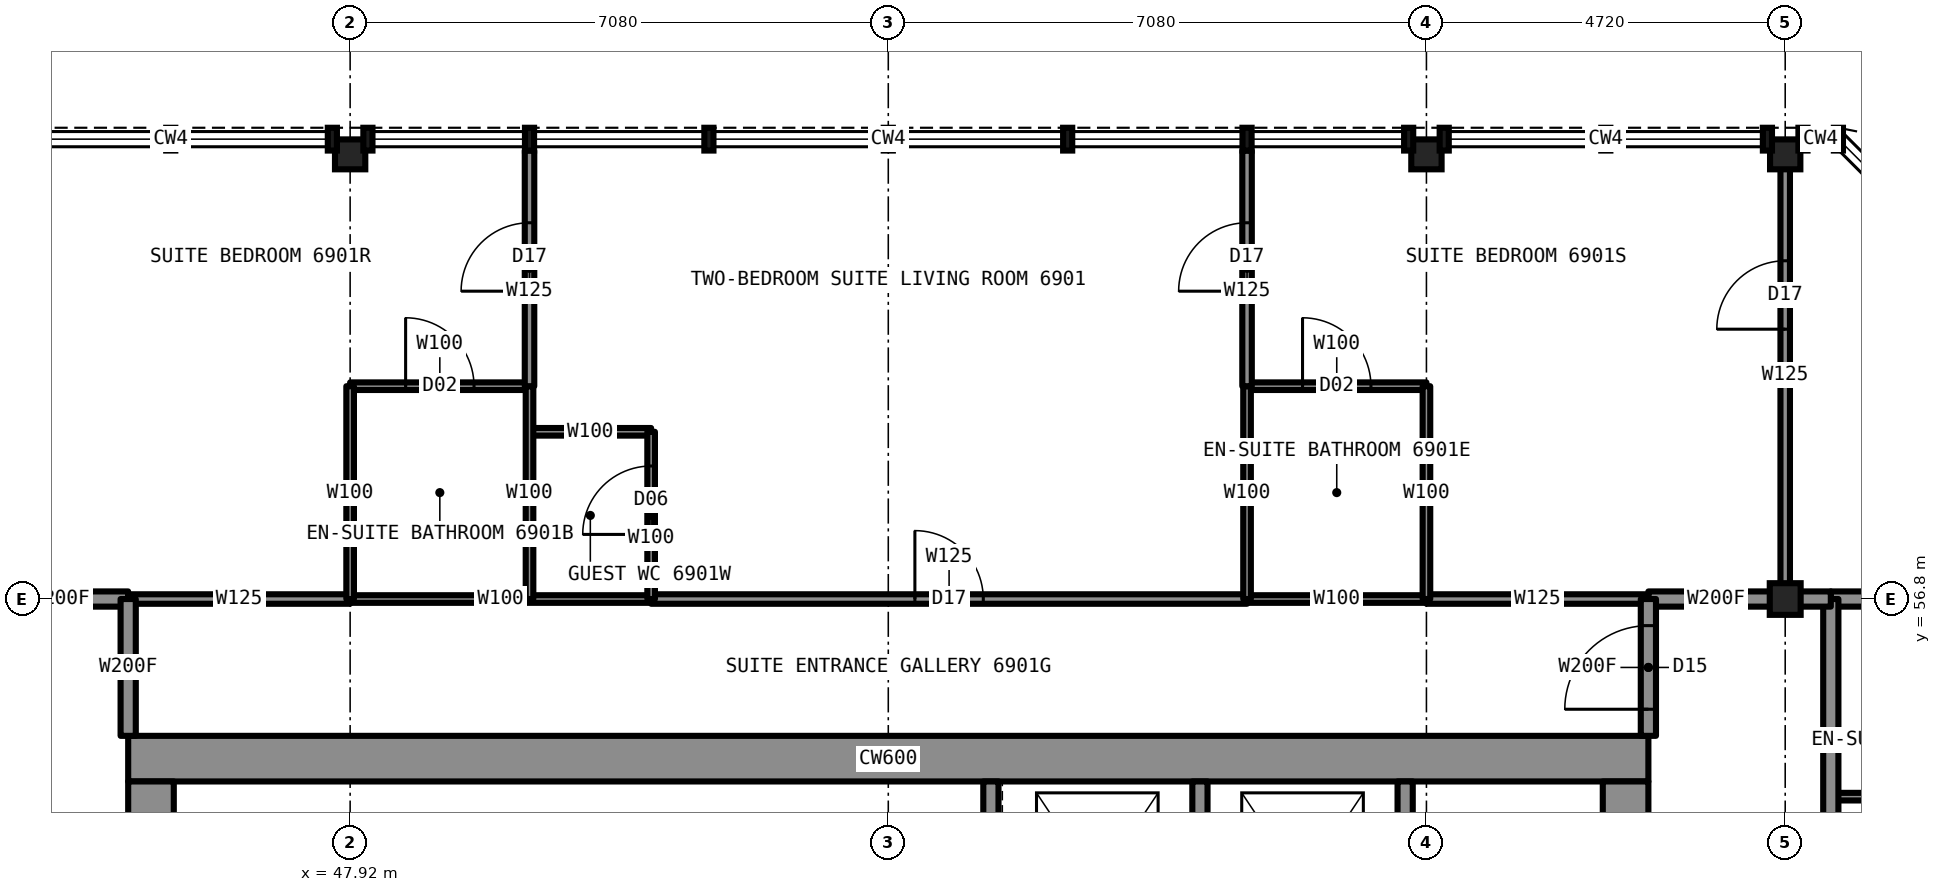
"""IFC4 building model, lengths in metres.
Left out: names, types, materials, properties, quantities, classifications, styles, units other than length and angle.
Written with IfcOpenShell. Run it as: python <this file> out.ifc"""

import sys

from ifc_helpers import new_model, si_unit, direction, frame, frame_2d, origin, origin_2d, place, context, subcontext, project, spatial, rectangle, i_section, extrude, element, fill, save


model = new_model("IFC4")
c1 = context("Model", 3, precision=1e-05, world=origin(), true_north=direction((0.0, 1.0)))
c2 = subcontext(c1, "Body", "Model", "MODEL_VIEW")
j1 = project(units=[si_unit("LENGTHUNIT", "METRE"), si_unit("PLANEANGLEUNIT", "RADIAN")], contexts=[c1])
p1 = place(None, origin())
s1 = spatial("IfcSite", under=j1, at=p1, CompositionType="ELEMENT")
p2 = place(p1, origin())
s2 = spatial("IfcBuilding", under=s1, at=p2, CompositionType="ELEMENT")
p3 = place(p2, frame((0.0, 0.0, 254.7)))
s3 = spatial("IfcBuildingStorey", under=s2, at=p3, CompositionType="ELEMENT", Elevation=254.7)
for number, where, z_axis, x_axis in (
    (1, (47.92, 62.65, 0.0), (0.0, 0.0, 1.0), (1.0, 0.0, 0.0)),
    (2, (62.08, 62.65, 0.0), (0.0, 0.0, 1.0), (1.0, 0.0, 0.0)),
    (3, (66.8, 62.65, 0.0), (0.0, 0.0, 1.0), (1.0, 0.0, 0.0)),
):
    element("IfcColumn", number, at=place(p3, frame(where, z_axis=z_axis, x_axis=x_axis)), inside=s3, PredefinedType="COLUMN", context=c2, shape_type="SweptSolid", body=[
        extrude(i_section(OverallWidth=0.399, OverallDepth=0.394, WebThickness=0.023, FlangeThickness=0.037, at=origin_2d()), origin(), (0.0, 0.0, 1.0), 3.5),
    ])
p4 = place(p3, frame((66.8, 56.8, 0.0), z_axis=(0.0, 0.0, 1.0), x_axis=(1.0, 0.0, 0.0)))
e4 = element("IfcColumn", 4, at=p4, inside=s3, PredefinedType="COLUMN", context=c2, shape_type="SweptSolid", body=[
    extrude(i_section(OverallWidth=0.406, OverallDepth=0.417, WebThickness=0.03, FlangeThickness=0.048, at=origin_2d()), origin(), (0.0, 0.0, 1.0), 3.5),
])
p5 = place(p3, frame((45.0, 54.7, 0.0), z_axis=(0.0, 0.0, 1.0), x_axis=(1.0, 0.0, 0.0)))
e5 = element("IfcWall", 5, at=p5, inside=s3, PredefinedType="SHEAR", context=c2, shape_type="SweptSolid", body=[
    extrude(rectangle(XDim=20.0, YDim=0.6, at=frame_2d((10.0, 0.0))), origin(), (0.0, 0.0, 1.0), 3.5),
])
p6 = place(p3, frame((64.7, 35.6, 0.0), z_axis=(0.0, 0.0, 1.0), x_axis=(0.0, 1.0, 0.0)))
e6 = element("IfcWall", 6, at=p6, inside=s3, PredefinedType="SHEAR", context=c2, shape_type="SweptSolid", body=[
    extrude(rectangle(XDim=18.8, YDim=0.6, at=frame_2d((9.4, 0.0))), origin(), (0.0, 0.0, 1.0), 3.5),
])
p7 = place(p6, frame((13.4, 0.0, 0.0)))
e7 = element("IfcOpeningElement", 7, at=p7, cuts=e6, PredefinedType="OPENING", context=c2, shape_type="SweptSolid", body=[
    extrude(rectangle(XDim=1.8, YDim=2.2, at=frame_2d((0.9, 1.1))), frame((0.0, 0.31, 0.0), z_axis=(0.0, -1.0, 0.0), x_axis=(1.0, 0.0, 0.0)), (0.0, 0.0, 1.0), 0.62),
])
p8 = place(p6, frame((3.6, 0.0, 0.0)))
e8 = element("IfcOpeningElement", 8, at=p8, cuts=e6, PredefinedType="OPENING", context=c2, shape_type="SweptSolid", body=[
    extrude(rectangle(XDim=1.8, YDim=2.2, at=frame_2d((0.9, 1.1))), frame((0.0, 0.31, 0.0), z_axis=(0.0, -1.0, 0.0), x_axis=(1.0, 0.0, 0.0)), (0.0, 0.0, 1.0), 0.62),
])
p9 = place(p3, frame((45.3, 35.6, 0.0), z_axis=(0.0, 0.0, 1.0), x_axis=(0.0, 1.0, 0.0)))
e9 = element("IfcWall", 9, at=p9, inside=s3, PredefinedType="SHEAR", context=c2, shape_type="SweptSolid", body=[
    extrude(rectangle(XDim=18.8, YDim=0.6, at=frame_2d((9.4, 0.0))), origin(), (0.0, 0.0, 1.0), 3.5),
])
p10 = place(p9, frame((13.4, 0.0, 0.0)))
e10 = element("IfcOpeningElement", 10, at=p10, cuts=e9, PredefinedType="OPENING", context=c2, shape_type="SweptSolid", body=[
    extrude(rectangle(XDim=1.8, YDim=2.2, at=frame_2d((0.9, 1.1))), frame((0.0, 0.31, 0.0), z_axis=(0.0, -1.0, 0.0), x_axis=(1.0, 0.0, 0.0)), (0.0, 0.0, 1.0), 0.62),
])
p11 = place(p9, frame((3.6, 0.0, 0.0)))
e11 = element("IfcOpeningElement", 11, at=p11, cuts=e9, PredefinedType="OPENING", context=c2, shape_type="SweptSolid", body=[
    extrude(rectangle(XDim=1.8, YDim=2.2, at=frame_2d((0.9, 1.1))), frame((0.0, 0.31, 0.0), z_axis=(0.0, -1.0, 0.0), x_axis=(1.0, 0.0, 0.0)), (0.0, 0.0, 1.0), 0.62),
])
p12 = place(p9, frame((6.4, 0.0, 0.0)))
e12 = element("IfcOpeningElement", 12, at=p12, cuts=e9, PredefinedType="OPENING", context=c2, shape_type="SweptSolid", body=[
    extrude(rectangle(XDim=1.2, YDim=2.2, at=frame_2d((0.6, 1.1))), frame((0.0, 0.31, 0.0), z_axis=(0.0, -1.0, 0.0), x_axis=(1.0, 0.0, 0.0)), (0.0, 0.0, 1.0), 0.62),
])
p13 = place(p3, frame((47.92, 56.8, 0.0), z_axis=(0.0, 0.0, 1.0), x_axis=(1.0, 0.0, 0.0)))
e13 = element("IfcWall", 13, at=p13, inside=s3, PredefinedType="PARTITIONING", context=c2, shape_type="SweptSolid", body=[
    extrude(rectangle(XDim=3.96, YDim=0.1, at=frame_2d((1.98, 0.0))), origin(), (0.0, 0.0, 1.0), 3.33),
])
p14 = place(p3, frame((59.72, 56.8, 0.0), z_axis=(0.0, 0.0, 1.0), x_axis=(1.0, 0.0, 0.0)))
e14 = element("IfcWall", 14, at=p14, inside=s3, PredefinedType="PARTITIONING", context=c2, shape_type="SweptSolid", body=[
    extrude(rectangle(XDim=2.36, YDim=0.1, at=frame_2d((1.18, 0.0))), origin(), (0.0, 0.0, 1.0), 3.33),
])
for number, where, z_axis, x_axis in (
    (15, (43.22, 56.8, 0.0), (0.0, 0.0, 1.0), (1.0, 0.0, 0.0)),
    (16, (65.0, 56.8, 0.0), (0.0, 0.0, 1.0), (1.0, 0.0, 0.0)),
):
    element("IfcWall", number, at=place(p3, frame(where, z_axis=z_axis, x_axis=x_axis)), inside=s3, PredefinedType="PARTITIONING", context=c2, shape_type="SweptSolid", body=[
        extrude(rectangle(XDim=1.78, YDim=0.2, at=frame_2d((0.89, 0.0))), origin(), (0.0, 0.0, 1.0), 3.33),
    ])
p15 = place(p3, frame((67.4, 56.8, 0.0), z_axis=(0.0, 0.0, 1.0), x_axis=(1.0, 0.0, 0.0)))
e17 = element("IfcWall", 17, at=p15, inside=s3, PredefinedType="PARTITIONING", context=c2, shape_type="SweptSolid", body=[
    extrude(rectangle(XDim=5.3, YDim=0.2, at=frame_2d((2.65, 0.0))), origin(), (0.0, 0.0, 1.0), 2.573),
])
p16 = place(p3, frame((45.0, 56.8, 0.0), z_axis=(0.0, 0.0, 1.0), x_axis=(1.0, 0.0, 0.0)))
e18 = element("IfcWall", 18, at=p16, inside=s3, PredefinedType="PARTITIONING", context=c2, shape_type="SweptSolid", body=[
    extrude(rectangle(XDim=2.92, YDim=0.125, at=frame_2d((1.46, 0.0))), origin(), (0.0, 0.0, 1.0), 3.33),
])
p17 = place(p3, frame((51.88, 56.8, 0.0), z_axis=(0.0, 0.0, 1.0), x_axis=(1.0, 0.0, 0.0)))
e19 = element("IfcWall", 19, at=p17, inside=s3, PredefinedType="PARTITIONING", context=c2, shape_type="SweptSolid", body=[
    extrude(rectangle(XDim=7.84, YDim=0.125, at=frame_2d((3.92, 0.0))), origin(), (0.0, 0.0, 1.0), 3.33),
])
p18 = place(p17, frame((3.47, 0.0, 0.0)))
e20 = element("IfcOpeningElement", 20, at=p18, cuts=e19, PredefinedType="OPENING", context=c2, shape_type="SweptSolid", body=[
    extrude(rectangle(XDim=0.9, YDim=2.2, at=frame_2d((0.45, 1.1))), frame((0.0, 0.073, 0.0), z_axis=(0.0, -1.0, 0.0), x_axis=(1.0, 0.0, 0.0)), (0.0, 0.0, 1.0), 0.145),
])
p19 = place(p3, frame((62.08, 56.8, 0.0), z_axis=(0.0, 0.0, 1.0), x_axis=(1.0, 0.0, 0.0)))
e21 = element("IfcWall", 21, at=p19, inside=s3, PredefinedType="PARTITIONING", context=c2, shape_type="SweptSolid", body=[
    extrude(rectangle(XDim=2.92, YDim=0.125, at=frame_2d((1.46, 0.0))), origin(), (0.0, 0.0, 1.0), 3.33),
])
p20 = place(p3, frame((50.28, 59.0, 0.0), z_axis=(0.0, 0.0, 1.0), x_axis=(1.0, 0.0, 0.0)))
e22 = element("IfcWall", 22, at=p20, inside=s3, PredefinedType="PARTITIONING", context=c2, shape_type="SweptSolid", body=[
    extrude(rectangle(XDim=1.6, YDim=0.1, at=frame_2d((0.8, 0.0))), origin(), (0.0, 0.0, 1.0), 3.33),
])
p21 = place(p3, frame((47.92, 59.6, 0.0), z_axis=(0.0, 0.0, 1.0), x_axis=(1.0, 0.0, 0.0)))
e23 = element("IfcWall", 23, at=p21, inside=s3, PredefinedType="PARTITIONING", context=c2, shape_type="SweptSolid", body=[
    extrude(rectangle(XDim=2.36, YDim=0.1, at=frame_2d((1.18, 0.0))), origin(), (0.0, 0.0, 1.0), 3.33),
])
p22 = place(p21, frame((0.73, 0.0, 0.0)))
e24 = element("IfcOpeningElement", 24, at=p22, cuts=e23, PredefinedType="OPENING", context=c2, shape_type="SweptSolid", body=[
    extrude(rectangle(XDim=0.9, YDim=2.1, at=frame_2d((0.45, 1.05))), frame((0.0, 0.06, 0.0), z_axis=(0.0, -1.0, 0.0), x_axis=(1.0, 0.0, 0.0)), (0.0, 0.0, 1.0), 0.12),
])
p23 = place(p3, frame((59.72, 59.6, 0.0), z_axis=(0.0, 0.0, 1.0), x_axis=(1.0, 0.0, 0.0)))
e25 = element("IfcWall", 25, at=p23, inside=s3, PredefinedType="PARTITIONING", context=c2, shape_type="SweptSolid", body=[
    extrude(rectangle(XDim=2.36, YDim=0.1, at=frame_2d((1.18, 0.0))), origin(), (0.0, 0.0, 1.0), 3.33),
])
p24 = place(p23, frame((0.73, 0.0, 0.0)))
e26 = element("IfcOpeningElement", 26, at=p24, cuts=e25, PredefinedType="OPENING", context=c2, shape_type="SweptSolid", body=[
    extrude(rectangle(XDim=0.9, YDim=2.1, at=frame_2d((0.45, 1.05))), frame((0.0, 0.06, 0.0), z_axis=(0.0, -1.0, 0.0), x_axis=(1.0, 0.0, 0.0)), (0.0, 0.0, 1.0), 0.12),
])
p25 = place(p3, frame((67.4, 54.2, 0.0), z_axis=(0.0, 0.0, 1.0), x_axis=(1.0, 0.0, 0.0)))
e27 = element("IfcWall", 27, at=p25, inside=s3, PredefinedType="PARTITIONING", context=c2, shape_type="SweptSolid", body=[
    extrude(rectangle(XDim=3.0, YDim=0.1, at=frame_2d((1.5, 0.0))), origin(), (0.0, 0.0, 1.0), 3.33),
])
p26 = place(p3, frame((45.0, 55.0, 0.0), z_axis=(0.0, 0.0, 1.0), x_axis=(0.0, 1.0, 0.0)))
e28 = element("IfcWall", 28, at=p26, inside=s3, PredefinedType="PARTITIONING", context=c2, shape_type="SweptSolid", body=[
    extrude(rectangle(XDim=1.8, YDim=0.2, at=frame_2d((0.9, 0.0))), origin(), (0.0, 0.0, 1.0), 3.33),
])
p27 = place(p3, frame((51.88, 56.8, 0.0), z_axis=(0.0, 0.0, 1.0), x_axis=(0.0, 1.0, 0.0)))
e29 = element("IfcWall", 29, at=p27, inside=s3, PredefinedType="PARTITIONING", context=c2, shape_type="SweptSolid", body=[
    extrude(rectangle(XDim=2.2, YDim=0.1, at=frame_2d((1.1, 0.0))), origin(), (0.0, 0.0, 1.0), 3.33),
])
p28 = place(p27, frame((0.85, 0.0, 0.0)))
e30 = element("IfcOpeningElement", 30, at=p28, cuts=e29, PredefinedType="OPENING", context=c2, shape_type="SweptSolid", body=[
    extrude(rectangle(XDim=0.9, YDim=2.1, at=frame_2d((0.45, 1.05))), frame((0.0, 0.06, 0.0), z_axis=(0.0, -1.0, 0.0), x_axis=(1.0, 0.0, 0.0)), (0.0, 0.0, 1.0), 0.12),
])
p29 = place(p3, frame((50.28, 56.8, 0.0), z_axis=(0.0, 0.0, 1.0), x_axis=(0.0, 1.0, 0.0)))
e31 = element("IfcWall", 31, at=p29, inside=s3, PredefinedType="PARTITIONING", context=c2, shape_type="SweptSolid", body=[
    extrude(rectangle(XDim=2.8, YDim=0.1, at=frame_2d((1.4, 0.0))), origin(), (0.0, 0.0, 1.0), 3.33),
])
p30 = place(p3, frame((50.28, 59.6, 0.0), z_axis=(0.0, 0.0, 1.0), x_axis=(0.0, 1.0, 0.0)))
e32 = element("IfcWall", 32, at=p30, inside=s3, PredefinedType="PARTITIONING", context=c2, shape_type="SweptSolid", body=[
    extrude(rectangle(XDim=3.1, YDim=0.125, at=frame_2d((1.55, 0.0))), origin(), (0.0, 0.0, 1.0), 3.33),
])
p31 = place(p30, frame((1.25, 0.0, 0.0)))
e33 = element("IfcOpeningElement", 33, at=p31, cuts=e32, PredefinedType="OPENING", context=c2, shape_type="SweptSolid", body=[
    extrude(rectangle(XDim=0.9, YDim=2.2, at=frame_2d((0.45, 1.1))), frame((0.0, 0.073, 0.0), z_axis=(0.0, -1.0, 0.0), x_axis=(1.0, 0.0, 0.0)), (0.0, 0.0, 1.0), 0.145),
])
p32 = place(p3, frame((47.92, 56.8, 0.0), z_axis=(0.0, 0.0, 1.0), x_axis=(0.0, 1.0, 0.0)))
e34 = element("IfcWall", 34, at=p32, inside=s3, PredefinedType="PARTITIONING", context=c2, shape_type="SweptSolid", body=[
    extrude(rectangle(XDim=2.8, YDim=0.1, at=frame_2d((1.4, 0.0))), origin(), (0.0, 0.0, 1.0), 2.573),
])
p33 = place(p3, frame((65.0, 55.0, 0.0), z_axis=(0.0, 0.0, 1.0), x_axis=(0.0, 1.0, 0.0)))
e35 = element("IfcWall", 35, at=p33, inside=s3, PredefinedType="PARTITIONING", context=c2, shape_type="SweptSolid", body=[
    extrude(rectangle(XDim=1.8, YDim=0.2, at=frame_2d((0.9, 0.0))), origin(), (0.0, 0.0, 1.0), 3.33),
])
p34 = place(p33, frame((0.35, 0.0, 0.0)))
e36 = element("IfcOpeningElement", 36, at=p34, cuts=e35, PredefinedType="OPENING", context=c2, shape_type="SweptSolid", body=[
    extrude(rectangle(XDim=1.1, YDim=2.2, at=frame_2d((0.55, 1.1))), frame((0.0, 0.11, 0.0), z_axis=(0.0, -1.0, 0.0), x_axis=(1.0, 0.0, 0.0)), (0.0, 0.0, 1.0), 0.22),
])
p35 = place(p3, frame((66.8, 56.8, 0.0), z_axis=(0.0, 0.0, 1.0), x_axis=(0.0, 1.0, 0.0)))
e37 = element("IfcWall", 37, at=p35, inside=s3, PredefinedType="PARTITIONING", context=c2, shape_type="SweptSolid", body=[
    extrude(rectangle(XDim=5.9, YDim=0.125, at=frame_2d((2.95, 0.0))), origin(), (0.0, 0.0, 1.0), 2.573),
])
p36 = place(p35, frame((3.55, 0.0, 0.0)))
e38 = element("IfcOpeningElement", 38, at=p36, cuts=e37, PredefinedType="OPENING", context=c2, shape_type="SweptSolid", body=[
    extrude(rectangle(XDim=0.9, YDim=2.2, at=frame_2d((0.45, 1.1))), frame((0.0, 0.073, 0.0), z_axis=(0.0, -1.0, 0.0), x_axis=(1.0, 0.0, 0.0)), (0.0, 0.0, 1.0), 0.145),
])
p37 = place(p3, frame((67.4, 33.2, 0.0), z_axis=(0.0, 0.0, 1.0), x_axis=(0.0, 1.0, 0.0)))
e39 = element("IfcWall", 39, at=p37, inside=s3, PredefinedType="PARTITIONING", context=c2, shape_type="SweptSolid", body=[
    extrude(rectangle(XDim=23.6, YDim=0.2, at=frame_2d((11.8, 0.0))), origin(), (0.0, 0.0, 1.0), 3.33),
])
p38 = place(p37, frame((8.95, 0.0, 0.0)))
e40 = element("IfcOpeningElement", 40, at=p38, cuts=e39, PredefinedType="OPENING", context=c2, shape_type="SweptSolid", body=[
    extrude(rectangle(XDim=1.1, YDim=2.2, at=frame_2d((0.55, 1.1))), frame((0.0, 0.11, 0.0), z_axis=(0.0, -1.0, 0.0), x_axis=(1.0, 0.0, 0.0)), (0.0, 0.0, 1.0), 0.22),
])
p39 = place(p3, frame((59.72, 56.8, 0.0), z_axis=(0.0, 0.0, 1.0), x_axis=(0.0, 1.0, 0.0)))
e41 = element("IfcWall", 41, at=p39, inside=s3, PredefinedType="PARTITIONING", context=c2, shape_type="SweptSolid", body=[
    extrude(rectangle(XDim=2.8, YDim=0.1, at=frame_2d((1.4, 0.0))), origin(), (0.0, 0.0, 1.0), 3.33),
])
p40 = place(p3, frame((59.72, 59.6, 0.0), z_axis=(0.0, 0.0, 1.0), x_axis=(0.0, 1.0, 0.0)))
e42 = element("IfcWall", 42, at=p40, inside=s3, PredefinedType="PARTITIONING", context=c2, shape_type="SweptSolid", body=[
    extrude(rectangle(XDim=3.1, YDim=0.125, at=frame_2d((1.55, 0.0))), origin(), (0.0, 0.0, 1.0), 3.33),
])
p41 = place(p40, frame((1.25, 0.0, 0.0)))
e43 = element("IfcOpeningElement", 43, at=p41, cuts=e42, PredefinedType="OPENING", context=c2, shape_type="SweptSolid", body=[
    extrude(rectangle(XDim=0.9, YDim=2.2, at=frame_2d((0.45, 1.1))), frame((0.0, 0.073, 0.0), z_axis=(0.0, -1.0, 0.0), x_axis=(1.0, 0.0, 0.0)), (0.0, 0.0, 1.0), 0.145),
])
p42 = place(p3, frame((62.08, 56.8, 0.0), z_axis=(0.0, 0.0, 1.0), x_axis=(0.0, 1.0, 0.0)))
e44 = element("IfcWall", 44, at=p42, inside=s3, PredefinedType="PARTITIONING", context=c2, shape_type="SweptSolid", body=[
    extrude(rectangle(XDim=2.8, YDim=0.1, at=frame_2d((1.4, 0.0))), origin(), (0.0, 0.0, 1.0), 2.573),
])
for number, where, z_axis, x_axis in (
    (45, (59.1, 51.7, 0.0), (0.0, 0.0, 1.0), (0.0, 1.0, 0.0)),
    (46, (61.8, 51.7, 0.0), (0.0, 0.0, 1.0), (0.0, 1.0, 0.0)),
    (47, (56.35, 51.7, 0.0), (0.0, 0.0, 1.0), (0.0, 1.0, 0.0)),
):
    element("IfcWall", number, at=place(p3, frame(where, z_axis=z_axis, x_axis=x_axis)), inside=s3, PredefinedType="PARTITIONING", context=c2, shape_type="SweptSolid", body=[
        extrude(rectangle(XDim=2.7, YDim=0.2, at=frame_2d((1.35, 0.0))), origin(), (0.0, 0.0, 1.0), 3.33),
    ])
p43 = place(p3, frame((66.78, 56.8, 0.0), z_axis=(0.0, 0.0, 1.0), x_axis=(1.0, 0.0, 0.0)))
e48 = element("IfcWall", 48, at=p43, inside=s3, PredefinedType="PARTITIONING", context=c2, shape_type="SweptSolid", body=[
    extrude(rectangle(XDim=0.62, YDim=0.2, at=frame_2d((0.31, 0.0))), origin(), (0.0, 0.0, 1.0), 2.573),
])
p44 = place(p18, origin())
e49 = element("IfcDoor", 49, at=p44, inside=s3, OperationType="SINGLE_SWING_LEFT", PredefinedType="DOOR", context=c2, shape_type="SweptSolid", body=[
    extrude(rectangle(XDim=0.9, YDim=2.2, at=frame_2d((0.45, 1.1))), frame((0.0, 0.025, 0.0), z_axis=(0.0, -1.0, 0.0), x_axis=(1.0, 0.0, 0.0)), (0.0, 0.0, 1.0), 0.05),
])
fill(e20, e49)
p45 = place(p22, origin())
e50 = element("IfcDoor", 50, at=p45, inside=s3, OperationType="SINGLE_SWING_RIGHT", PredefinedType="DOOR", context=c2, shape_type="SweptSolid", body=[
    extrude(rectangle(XDim=0.9, YDim=2.1, at=frame_2d((0.45, 1.05))), frame((0.0, 0.025, 0.0), z_axis=(0.0, -1.0, 0.0), x_axis=(1.0, 0.0, 0.0)), (0.0, 0.0, 1.0), 0.05),
])
fill(e24, e50)
p46 = place(p24, origin())
e51 = element("IfcDoor", 51, at=p46, inside=s3, OperationType="SINGLE_SWING_RIGHT", PredefinedType="DOOR", context=c2, shape_type="SweptSolid", body=[
    extrude(rectangle(XDim=0.9, YDim=2.1, at=frame_2d((0.45, 1.05))), frame((0.0, 0.025, 0.0), z_axis=(0.0, -1.0, 0.0), x_axis=(1.0, 0.0, 0.0)), (0.0, 0.0, 1.0), 0.05),
])
fill(e26, e51)
p47 = place(p34, origin())
e52 = element("IfcDoor", 52, at=p47, inside=s3, OperationType="SINGLE_SWING_LEFT", PredefinedType="DOOR", context=c2, shape_type="SweptSolid", body=[
    extrude(rectangle(XDim=1.1, YDim=2.2, at=frame_2d((0.55, 1.1))), frame((0.0, 0.025, 0.0), z_axis=(0.0, -1.0, 0.0), x_axis=(1.0, 0.0, 0.0)), (0.0, 0.0, 1.0), 0.05),
])
fill(e36, e52)
p48 = place(p31, origin())
e53 = element("IfcDoor", 53, at=p48, inside=s3, OperationType="SINGLE_SWING_LEFT", PredefinedType="DOOR", context=c2, shape_type="SweptSolid", body=[
    extrude(rectangle(XDim=0.9, YDim=2.2, at=frame_2d((0.45, 1.1))), frame((0.0, 0.025, 0.0), z_axis=(0.0, -1.0, 0.0), x_axis=(1.0, 0.0, 0.0)), (0.0, 0.0, 1.0), 0.05),
])
fill(e33, e53)
p49 = place(p41, origin())
e54 = element("IfcDoor", 54, at=p49, inside=s3, OperationType="SINGLE_SWING_LEFT", PredefinedType="DOOR", context=c2, shape_type="SweptSolid", body=[
    extrude(rectangle(XDim=0.9, YDim=2.2, at=frame_2d((0.45, 1.1))), frame((0.0, 0.025, 0.0), z_axis=(0.0, -1.0, 0.0), x_axis=(1.0, 0.0, 0.0)), (0.0, 0.0, 1.0), 0.05),
])
fill(e43, e54)
p50 = place(p36, origin())
e55 = element("IfcDoor", 55, at=p50, inside=s3, OperationType="SINGLE_SWING_LEFT", PredefinedType="DOOR", context=c2, shape_type="SweptSolid", body=[
    extrude(rectangle(XDim=0.9, YDim=2.2, at=frame_2d((0.45, 1.1))), frame((0.0, 0.025, 0.0), z_axis=(0.0, -1.0, 0.0), x_axis=(1.0, 0.0, 0.0)), (0.0, 0.0, 1.0), 0.05),
])
fill(e38, e55)
p51 = place(p28, origin())
e56 = element("IfcDoor", 56, at=p51, inside=s3, OperationType="SINGLE_SWING_LEFT", PredefinedType="DOOR", context=c2, shape_type="SweptSolid", body=[
    extrude(rectangle(XDim=0.9, YDim=2.1, at=frame_2d((0.45, 1.05))), frame((0.0, 0.025, 0.0), z_axis=(0.0, -1.0, 0.0), x_axis=(1.0, 0.0, 0.0)), (0.0, 0.0, 1.0), 0.05),
])
fill(e30, e56)
save(model, sys.argv[1])
